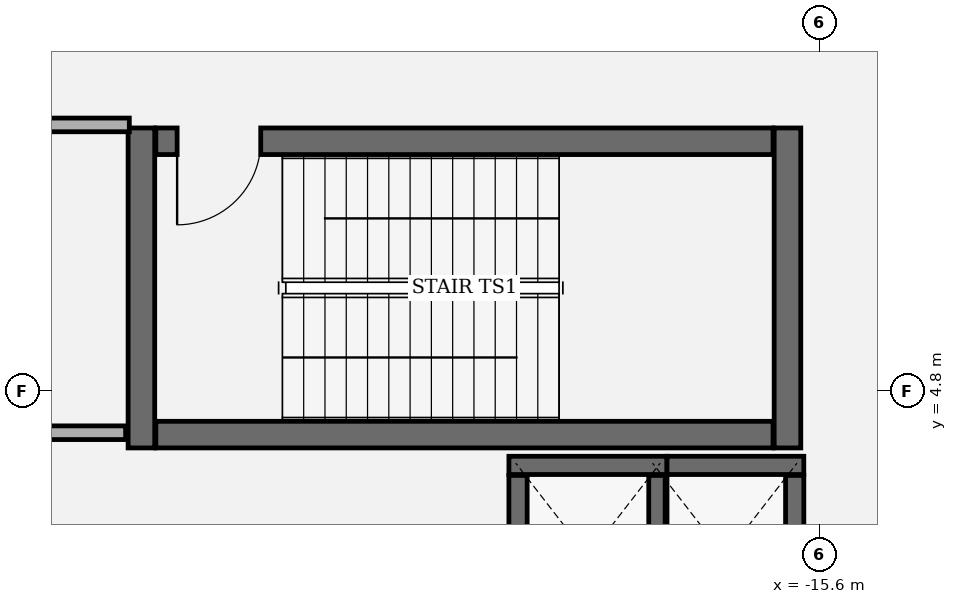
"""IFC4 building model, lengths in metres.
Left out: names, types, materials, properties, quantities, classifications, styles, units other than length and angle.
Written with IfcOpenShell. Run it as: python <this file> out.ifc"""

import sys

from ifc_helpers import new_model, si_unit, direction, frame, frame_2d, origin, place, context, subcontext, project, spatial, rectangle, extrude, element, fill, save


model = new_model("IFC4")
c1 = context("Model", 3, precision=1e-05, world=origin(), true_north=direction((0.0, 1.0)))
c2 = subcontext(c1, "Body", "Model", "MODEL_VIEW")
j1 = project(units=[si_unit("LENGTHUNIT", "METRE"), si_unit("PLANEANGLEUNIT", "RADIAN")], contexts=[c1])
p1 = place(None, origin())
s1 = spatial("IfcSite", under=j1, at=p1, CompositionType="ELEMENT")
p2 = place(p1, origin())
s2 = spatial("IfcBuilding", under=s1, at=p2, CompositionType="ELEMENT")
p3 = place(p2, frame((0.0, 0.0, 17.0)))
s3 = spatial("IfcBuildingStorey", under=s2, at=p3, CompositionType="ELEMENT", Elevation=17.0)
p4 = place(p3, frame((-64.419, 4.637, 0.0), z_axis=(0.0, 0.0, 1.0), x_axis=(0.842602364841, 0.538536214905, 0.0)))
e1 = element("IfcWall", 1, at=p4, inside=s3, PredefinedType="SOLIDWALL", context=c2, shape_type="SweptSolid", body=[
    extrude(rectangle(XDim=60.27, YDim=0.38, at=frame_2d((30.135, 0.0))), origin(), (0.0, 0.0, 1.0), 4.74),
])
p5 = place(p4, frame((29.435, 0.0, 0.8)))
e2 = element("IfcOpeningElement", 2, at=p5, cuts=e1, PredefinedType="OPENING", context=c2, shape_type="SweptSolid", body=[
    extrude(rectangle(XDim=1.4, YDim=1.5, at=frame_2d((0.7, 0.75))), frame((0.0, 0.2, 0.0), z_axis=(0.0, -1.0, 0.0), x_axis=(1.0, 0.0, 0.0)), (0.0, 0.0, 1.0), 0.4),
])
for number, where, z_axis, x_axis in (
    (3, (-24.525, 8.26, 0.0), (0.0, 0.0, 1.0), (0.0, -1.0, 0.0)),
    (4, (-16.025, 4.05, 0.0), (0.0, 0.0, 1.0), (0.0, 1.0, 0.0)),
):
    element("IfcWall", number, at=place(p3, frame(where, z_axis=z_axis, x_axis=x_axis)), inside=s3, PredefinedType="SHEAR", context=c2, shape_type="SweptSolid", body=[
        extrude(rectangle(XDim=4.21, YDim=0.35, at=frame_2d((2.105, 0.0))), origin(), (0.0, 0.0, 1.0), 4.74),
    ])
p6 = place(p3, frame((-24.335, 4.225, 0.0), z_axis=(0.0, 0.0, 1.0), x_axis=(1.0, 0.0, 0.0)))
e5 = element("IfcWall", 5, at=p6, inside=s3, PredefinedType="SHEAR", context=c2, shape_type="SweptSolid", body=[
    extrude(rectangle(XDim=8.12, YDim=0.35, at=frame_2d((4.06, 0.0))), origin(), (0.0, 0.0, 1.0), 4.74),
])
p7 = place(p3, frame((-16.215, 8.085, 0.0), z_axis=(0.0, 0.0, 1.0), x_axis=(-1.0, 0.0, 0.0)))
e6 = element("IfcWall", 6, at=p7, inside=s3, PredefinedType="SHEAR", context=c2, shape_type="SweptSolid", body=[
    extrude(rectangle(XDim=8.12, YDim=0.35, at=frame_2d((4.06, 0.0))), origin(), (0.0, 0.0, 1.0), 4.74),
])
p8 = place(p7, frame((6.74, 0.0, 0.0)))
e7 = element("IfcOpeningElement", 7, at=p8, cuts=e6, PredefinedType="OPENING", context=c2, shape_type="SweptSolid", body=[
    extrude(rectangle(XDim=1.1, YDim=2.2, at=frame_2d((0.55, 1.1))), frame((0.0, 0.185, 0.0), z_axis=(0.0, -1.0, 0.0), x_axis=(1.0, 0.0, 0.0)), (0.0, 0.0, 1.0), 0.37),
])
p9 = place(p3, frame((-19.69, 3.82, 0.0), z_axis=(0.0, 0.0, 1.0), x_axis=(1.0, 0.0, 0.0)))
e8 = element("IfcWall", 8, at=p9, inside=s3, PredefinedType="SHEAR", context=c2, shape_type="SweptSolid", body=[
    extrude(rectangle(XDim=2.08, YDim=0.24, at=frame_2d((1.04, 0.0))), origin(), (0.0, 0.0, 1.0), 4.74),
])
for number, where, z_axis, x_axis in (
    (9, (-19.57, 1.562, 0.0), (0.0, 0.0, 1.0), (0.0, 1.0, 0.0)),
    (10, (-17.73, 3.688, 0.0), (0.0, 0.0, 1.0), (0.0, -1.0, 0.0)),
):
    element("IfcWall", number, at=place(p3, frame(where, z_axis=z_axis, x_axis=x_axis)), inside=s3, PredefinedType="SHEAR", context=c2, shape_type="SweptSolid", body=[
        extrude(rectangle(XDim=2.126, YDim=0.24, at=frame_2d((1.063, 0.0))), origin(), (0.0, 0.0, 1.0), 4.74),
    ])
p10 = place(p3, frame((-17.61, 3.82, 0.0), z_axis=(0.0, 0.0, 1.0), x_axis=(1.0, 0.0, 0.0)))
e11 = element("IfcWall", 11, at=p10, inside=s3, PredefinedType="SHEAR", context=c2, shape_type="SweptSolid", body=[
    extrude(rectangle(XDim=1.8, YDim=0.24, at=frame_2d((0.9, 0.0))), origin(), (0.0, 0.0, 1.0), 4.74),
])
p11 = place(p3, frame((-15.93, 3.688, 0.0), z_axis=(0.0, 0.0, 1.0), x_axis=(0.0, -1.0, 0.0)))
e12 = element("IfcWall", 12, at=p11, inside=s3, PredefinedType="SHEAR", context=c2, shape_type="SweptSolid", body=[
    extrude(rectangle(XDim=2.126, YDim=0.24, at=frame_2d((1.063, 0.0))), origin(), (0.0, 0.0, 1.0), 4.74),
])
p12 = place(p3, frame((-28.355, 4.25, 0.0), z_axis=(0.0, 0.0, 1.0), x_axis=(1.0, 0.0, 0.0)))
e13 = element("IfcWall", 13, at=p12, inside=s3, PredefinedType="PARTITIONING", context=c2, shape_type="SweptSolid", body=[
    extrude(rectangle(XDim=3.622, YDim=0.18, at=frame_2d((1.811, 0.0))), origin(), (0.0, 0.0, 1.0), 4.74),
])
p13 = place(p3, frame((-24.684, 8.3, 0.0), z_axis=(0.0, 0.0, 1.0), x_axis=(-1.0, 0.0, 0.0)))
e14 = element("IfcWall", 14, at=p13, inside=s3, PredefinedType="PARTITIONING", context=c2, shape_type="SweptSolid", body=[
    extrude(rectangle(XDim=3.671, YDim=0.18, at=frame_2d((1.835, 0.0))), origin(), (0.0, 0.0, 1.0), 4.253),
])
p14 = place(p13, frame((1.335, 0.0, 0.0)))
e15 = element("IfcOpeningElement", 15, at=p14, cuts=e14, PredefinedType="OPENING", context=c2, shape_type="SweptSolid", body=[
    extrude(rectangle(XDim=1.0, YDim=2.15, at=frame_2d((0.5, 1.075))), frame((0.0, 0.1, 0.0), z_axis=(0.0, -1.0, 0.0), x_axis=(1.0, 0.0, 0.0)), (0.0, 0.0, 1.0), 0.2),
])
p15 = place(p8, origin())
e16 = element("IfcDoor", 16, at=p15, inside=s3, OperationType="SINGLE_SWING_RIGHT", PredefinedType="DOOR", context=c2, shape_type="SweptSolid", body=[
    extrude(rectangle(XDim=1.1, YDim=2.2, at=frame_2d((0.55, 1.1))), frame((0.0, 0.025, 0.0), z_axis=(0.0, -1.0, 0.0), x_axis=(1.0, 0.0, 0.0)), (0.0, 0.0, 1.0), 0.05),
])
fill(e7, e16)
save(model, sys.argv[1])
